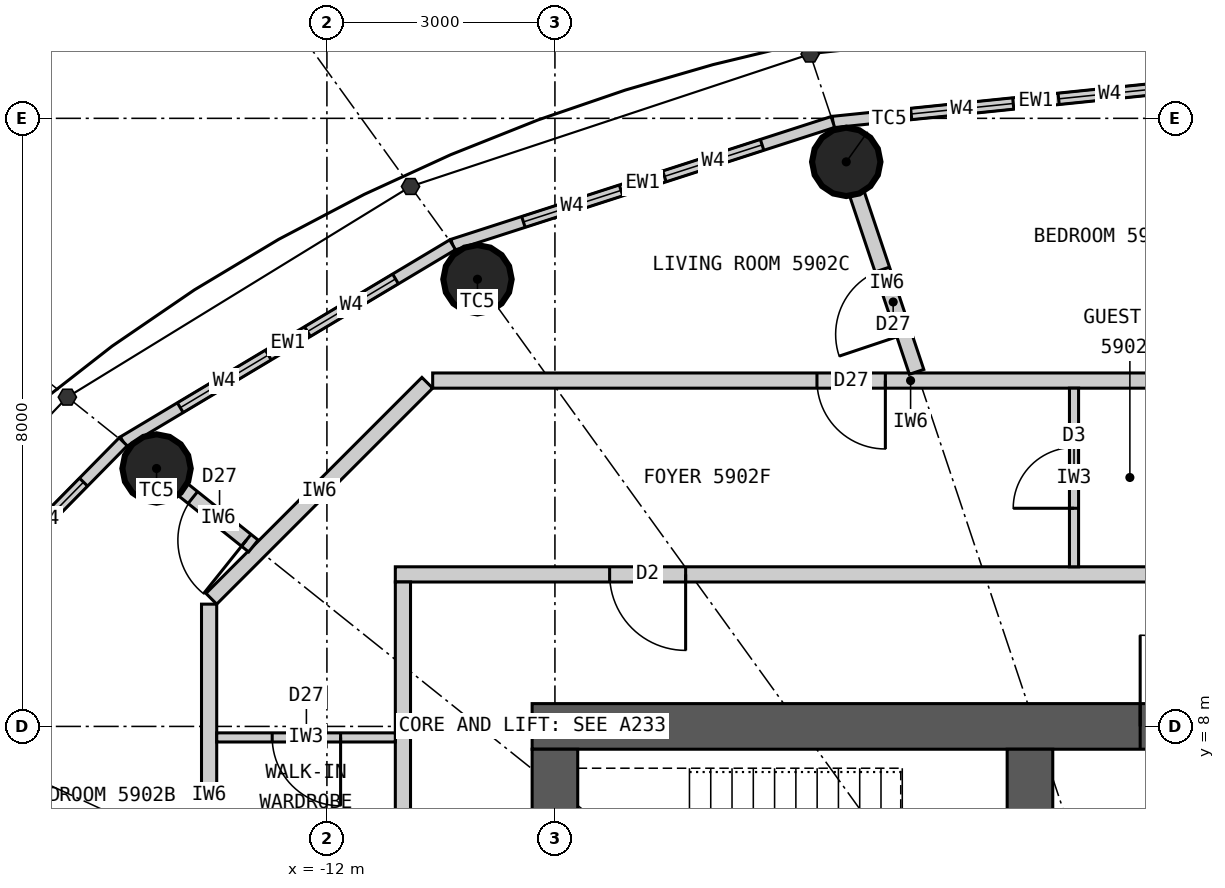
"""IFC4 building model, lengths in metres.
Left out: names, types, materials, properties, quantities, classifications, styles, units other than length and angle.
Written with IfcOpenShell. Run it as: python <this file> out.ifc"""

import sys

from ifc_helpers import new_model, si_unit, direction, frame, frame_2d, origin, origin_2d, place, context, subcontext, project, spatial, rectangle, circle, extrude, element, fill, save


model = new_model("IFC4")
c1 = context("Model", 3, precision=1e-05, world=origin(), true_north=direction((0.0, 1.0)))
c2 = subcontext(c1, "Body", "Model", "MODEL_VIEW")
j1 = project(units=[si_unit("LENGTHUNIT", "METRE"), si_unit("PLANEANGLEUNIT", "RADIAN")], contexts=[c1])
p1 = place(None, origin())
s1 = spatial("IfcSite", under=j1, at=p1, CompositionType="ELEMENT")
p2 = place(p1, origin())
s2 = spatial("IfcBuilding", under=s1, at=p2, CompositionType="ELEMENT")
p3 = place(p2, frame((0.0, 0.0, 219.3)))
s3 = spatial("IfcBuildingStorey", under=s2, at=p3, CompositionType="ELEMENT", Elevation=219.3)
for number, where, z_axis, x_axis in (
    (1, (-5.167, 15.427, 0.0), (0.0, 0.0, 1.0), (1.0, 0.0, 0.0)),
    (2, (-10.019, 13.883, 0.0), (0.0, 0.0, 1.0), (1.0, 0.0, 0.0)),
    (3, (-14.241, 11.393, 0.0), (0.0, 0.0, 1.0), (1.0, 0.0, 0.0)),
):
    element("IfcColumn", number, at=place(p3, frame(where, z_axis=z_axis, x_axis=x_axis)), inside=s3, PredefinedType="COLUMN", context=c2, shape_type="SweptSolid", body=[
        extrude(circle(Radius=0.45, at=origin_2d()), origin(), (0.0, 0.0, 1.0), 3.3),
    ])
p4 = place(p3, frame((-9.3, 8.0, 0.0), z_axis=(0.0, 0.0, 1.0), x_axis=(1.0, 0.0, 0.0)))
e4 = element("IfcWall", 4, at=p4, inside=s3, PredefinedType="SHEAR", context=c2, shape_type="SweptSolid", body=[
    extrude(rectangle(XDim=18.6, YDim=0.6, at=frame_2d((9.3, 0.0))), origin(), (0.0, 0.0, 1.0), 3.3),
])
p5 = place(p4, frame((8.0, 0.0, 0.0)))
e5 = element("IfcOpeningElement", 5, at=p5, cuts=e4, PredefinedType="OPENING", context=c2, shape_type="SweptSolid", body=[
    extrude(rectangle(XDim=1.2, YDim=2.2, at=frame_2d((0.6, 1.1))), frame((0.0, 0.31, 0.0), z_axis=(0.0, -1.0, 0.0), x_axis=(1.0, 0.0, 0.0)), (0.0, 0.0, 1.0), 0.62),
])
p6 = place(p4, frame((15.6, 0.0, 0.0)))
e6 = element("IfcOpeningElement", 6, at=p6, cuts=e4, PredefinedType="OPENING", context=c2, shape_type="SweptSolid", body=[
    extrude(rectangle(XDim=0.9, YDim=2.2, at=frame_2d((0.45, 1.1))), frame((0.0, 0.31, 0.0), z_axis=(0.0, -1.0, 0.0), x_axis=(1.0, 0.0, 0.0)), (0.0, 0.0, 1.0), 0.62),
])
p7 = place(p3, frame((-9.0, 7.7, 0.0), z_axis=(0.0, 0.0, 1.0), x_axis=(0.0, -1.0, 0.0)))
e7 = element("IfcWall", 7, at=p7, inside=s3, PredefinedType="SHEAR", context=c2, shape_type="SweptSolid", body=[
    extrude(rectangle(XDim=15.4, YDim=0.6, at=frame_2d((7.7, 0.0))), origin(), (0.0, 0.0, 1.0), 3.3),
])
p8 = place(p7, frame((6.8, 0.0, 0.0)))
e8 = element("IfcOpeningElement", 8, at=p8, cuts=e7, PredefinedType="OPENING", context=c2, shape_type="SweptSolid", body=[
    extrude(rectangle(XDim=1.8, YDim=2.2, at=frame_2d((0.9, 1.1))), frame((0.0, 0.31, 0.0), z_axis=(0.0, -1.0, 0.0), x_axis=(1.0, 0.0, 0.0)), (0.0, 0.0, 1.0), 0.62),
])
p9 = place(p3, frame((-2.75, 4.5, 0.0), z_axis=(0.0, 0.0, 1.0), x_axis=(0.0, 1.0, 0.0)))
e9 = element("IfcWall", 9, at=p9, inside=s3, PredefinedType="SHEAR", context=c2, shape_type="SweptSolid", body=[
    extrude(rectangle(XDim=3.2, YDim=0.6, at=frame_2d((1.6, 0.0))), origin(), (0.0, 0.0, 1.0), 3.3),
])
p10 = place(p9, frame((0.925, 0.0, 0.0)))
e10 = element("IfcOpeningElement", 10, at=p10, cuts=e9, PredefinedType="OPENING", context=c2, shape_type="SweptSolid", body=[
    extrude(rectangle(XDim=1.1, YDim=2.2, at=frame_2d((0.55, 1.1))), frame((0.0, 0.31, 0.0), z_axis=(0.0, -1.0, 0.0), x_axis=(1.0, 0.0, 0.0)), (0.0, 0.0, 1.0), 0.62),
])
p11 = place(p3, frame((0.0, 16.5, 0.0), z_axis=(0.0, 0.0, 1.0), x_axis=(-0.994774574972, -0.102095763818, 0.0)))
e11 = element("IfcWall", 11, at=p11, inside=s3, PredefinedType="ELEMENTEDWALL", context=c2, shape_type="SweptSolid", body=[
    extrude(rectangle(XDim=5.371, YDim=0.15, at=frame_2d((2.686, 0.0))), origin(), (0.0, 0.0, 1.0), 3.12),
])
p12 = place(p11, frame((1.035, 0.0, 0.9)))
e12 = element("IfcOpeningElement", 12, at=p12, cuts=e11, PredefinedType="OPENING", context=c2, shape_type="SweptSolid", body=[
    extrude(rectangle(XDim=1.35, YDim=1.9, at=frame_2d((0.675, 0.95))), frame((0.0, 0.085, 0.0), z_axis=(0.0, -1.0, 0.0), x_axis=(1.0, 0.0, 0.0)), (0.0, 0.0, 1.0), 0.17),
])
p13 = place(p11, frame((2.985, 0.0, 0.9)))
e13 = element("IfcOpeningElement", 13, at=p13, cuts=e11, PredefinedType="OPENING", context=c2, shape_type="SweptSolid", body=[
    extrude(rectangle(XDim=1.35, YDim=1.9, at=frame_2d((0.675, 0.95))), frame((0.0, 0.085, 0.0), z_axis=(0.0, -1.0, 0.0), x_axis=(1.0, 0.0, 0.0)), (0.0, 0.0, 1.0), 0.17),
])
p14 = place(p3, frame((-5.343, 15.952, 0.0), z_axis=(0.0, 0.0, 1.0), x_axis=(-0.951644702515, -0.307200846638, 0.0)))
e14 = element("IfcWall", 14, at=p14, inside=s3, PredefinedType="ELEMENTEDWALL", context=c2, shape_type="SweptSolid", body=[
    extrude(rectangle(XDim=5.258, YDim=0.15, at=frame_2d((2.629, 0.0))), origin(), (0.0, 0.0, 1.0), 3.12),
])
p15 = place(p14, frame((0.979, 0.0, 0.9)))
e15 = element("IfcOpeningElement", 15, at=p15, cuts=e14, PredefinedType="OPENING", context=c2, shape_type="SweptSolid", body=[
    extrude(rectangle(XDim=1.35, YDim=1.9, at=frame_2d((0.675, 0.95))), frame((0.0, 0.085, 0.0), z_axis=(0.0, -1.0, 0.0), x_axis=(1.0, 0.0, 0.0)), (0.0, 0.0, 1.0), 0.17),
])
p16 = place(p14, frame((2.929, 0.0, 0.9)))
e16 = element("IfcOpeningElement", 16, at=p16, cuts=e14, PredefinedType="OPENING", context=c2, shape_type="SweptSolid", body=[
    extrude(rectangle(XDim=1.35, YDim=1.9, at=frame_2d((0.675, 0.95))), frame((0.0, 0.085, 0.0), z_axis=(0.0, -1.0, 0.0), x_axis=(1.0, 0.0, 0.0)), (0.0, 0.0, 1.0), 0.17),
])
p17 = place(p3, frame((-10.346, 14.336, 0.0), z_axis=(0.0, 0.0, 1.0), x_axis=(-0.85822150553, -0.513279502265, 0.0)))
e17 = element("IfcWall", 17, at=p17, inside=s3, PredefinedType="ELEMENTEDWALL", context=c2, shape_type="SweptSolid", body=[
    extrude(rectangle(XDim=5.05, YDim=0.15, at=frame_2d((2.525, 0.0))), origin(), (0.0, 0.0, 1.0), 3.12),
])
p18 = place(p17, frame((0.875, 0.0, 0.9)))
e18 = element("IfcOpeningElement", 18, at=p18, cuts=e17, PredefinedType="OPENING", context=c2, shape_type="SweptSolid", body=[
    extrude(rectangle(XDim=1.35, YDim=1.9, at=frame_2d((0.675, 0.95))), frame((0.0, 0.085, 0.0), z_axis=(0.0, -1.0, 0.0), x_axis=(1.0, 0.0, 0.0)), (0.0, 0.0, 1.0), 0.17),
])
p19 = place(p17, frame((2.825, 0.0, 0.9)))
e19 = element("IfcOpeningElement", 19, at=p19, cuts=e17, PredefinedType="OPENING", context=c2, shape_type="SweptSolid", body=[
    extrude(rectangle(XDim=1.35, YDim=1.9, at=frame_2d((0.675, 0.95))), frame((0.0, 0.085, 0.0), z_axis=(0.0, -1.0, 0.0), x_axis=(1.0, 0.0, 0.0)), (0.0, 0.0, 1.0), 0.17),
])
p20 = place(p3, frame((-14.68, 11.744, 0.0), z_axis=(0.0, 0.0, 1.0), x_axis=(-0.701527379618, -0.712642501993, 0.0)))
e20 = element("IfcWall", 20, at=p20, inside=s3, PredefinedType="ELEMENTEDWALL", context=c2, shape_type="SweptSolid", body=[
    extrude(rectangle(XDim=4.788, YDim=0.15, at=frame_2d((2.394, 0.0))), origin(), (0.0, 0.0, 1.0), 3.12),
])
p21 = place(p20, frame((0.744, 0.0, 0.9)))
e21 = element("IfcOpeningElement", 21, at=p21, cuts=e20, PredefinedType="OPENING", context=c2, shape_type="SweptSolid", body=[
    extrude(rectangle(XDim=1.35, YDim=1.9, at=frame_2d((0.675, 0.95))), frame((0.0, 0.085, 0.0), z_axis=(0.0, -1.0, 0.0), x_axis=(1.0, 0.0, 0.0)), (0.0, 0.0, 1.0), 0.17),
])
p22 = place(p20, frame((2.694, 0.0, 0.9)))
e22 = element("IfcOpeningElement", 22, at=p22, cuts=e20, PredefinedType="OPENING", context=c2, shape_type="SweptSolid", body=[
    extrude(rectangle(XDim=1.35, YDim=1.9, at=frame_2d((0.675, 0.95))), frame((0.0, 0.085, 0.0), z_axis=(0.0, -1.0, 0.0), x_axis=(1.0, 0.0, 0.0)), (0.0, 0.0, 1.0), 0.17),
])
p23 = place(p3, frame((-11.1, 10.0, 0.0), z_axis=(0.0, 0.0, 1.0), x_axis=(1.0, 0.0, 0.0)))
e23 = element("IfcWall", 23, at=p23, inside=s3, PredefinedType="PARTITIONING", context=c2, shape_type="SweptSolid", body=[
    extrude(rectangle(XDim=22.2, YDim=0.2, at=frame_2d((11.1, 0.0))), origin(), (0.0, 0.0, 1.0), 3.12),
])
p24 = place(p23, frame((20.9, 0.0, 0.0)))
e24 = element("IfcOpeningElement", 24, at=p24, cuts=e23, PredefinedType="OPENING", context=c2, shape_type="SweptSolid", body=[
    extrude(rectangle(XDim=1.0, YDim=2.2, at=frame_2d((0.5, 1.1))), frame((0.0, 0.11, 0.0), z_axis=(0.0, -1.0, 0.0), x_axis=(1.0, 0.0, 0.0)), (0.0, 0.0, 1.0), 0.22),
])
p25 = place(p23, frame((2.82, 0.0, 0.0)))
e25 = element("IfcOpeningElement", 25, at=p25, cuts=e23, PredefinedType="OPENING", context=c2, shape_type="SweptSolid", body=[
    extrude(rectangle(XDim=1.0, YDim=2.2, at=frame_2d((0.5, 1.1))), frame((0.0, 0.11, 0.0), z_axis=(0.0, -1.0, 0.0), x_axis=(1.0, 0.0, 0.0)), (0.0, 0.0, 1.0), 0.22),
])
p26 = place(p3, frame((-11.0, 9.9, 0.0), z_axis=(0.0, 0.0, 1.0), x_axis=(0.0, -1.0, 0.0)))
e26 = element("IfcWall", 26, at=p26, inside=s3, PredefinedType="PARTITIONING", context=c2, shape_type="SweptSolid", body=[
    extrude(rectangle(XDim=10.114, YDim=0.2, at=frame_2d((5.057, 0.0))), origin(), (0.0, 0.0, 1.0), 3.12),
])
p27 = place(p3, frame((1.968, 12.55, 0.0), z_axis=(0.0, 0.0, 1.0), x_axis=(-1.0, 0.0, 0.0)))
e27 = element("IfcWall", 27, at=p27, inside=s3, PredefinedType="PARTITIONING", context=c2, shape_type="SweptSolid", body=[
    extrude(rectangle(XDim=12.576, YDim=0.2, at=frame_2d((6.288, 0.0))), origin(), (0.0, 0.0, 1.0), 3.12),
])
p28 = place(p27, frame((1.708, 0.0, 0.0)))
e28 = element("IfcOpeningElement", 28, at=p28, cuts=e27, PredefinedType="OPENING", context=c2, shape_type="SweptSolid", body=[
    extrude(rectangle(XDim=0.8, YDim=2.1, at=frame_2d((0.4, 1.05))), frame((0.0, 0.11, 0.0), z_axis=(0.0, -1.0, 0.0), x_axis=(1.0, 0.0, 0.0)), (0.0, 0.0, 1.0), 0.22),
])
p29 = place(p27, frame((6.62, 0.0, 0.0)))
e29 = element("IfcOpeningElement", 29, at=p29, cuts=e27, PredefinedType="OPENING", context=c2, shape_type="SweptSolid", body=[
    extrude(rectangle(XDim=0.9, YDim=2.1, at=frame_2d((0.45, 1.05))), frame((0.0, 0.11, 0.0), z_axis=(0.0, -1.0, 0.0), x_axis=(1.0, 0.0, 0.0)), (0.0, 0.0, 1.0), 0.22),
])
p30 = place(p3, frame((-10.679, 12.521, 0.0), z_axis=(0.0, 0.0, 1.0), x_axis=(-0.707106781187, -0.707106781187, 0.0)))
e30 = element("IfcWall", 30, at=p30, inside=s3, PredefinedType="PARTITIONING", context=c2, shape_type="SweptSolid", body=[
    extrude(rectangle(XDim=4.019, YDim=0.2, at=frame_2d((2.009, 0.0))), origin(), (0.0, 0.0, 1.0), 3.12),
])
p31 = place(p3, frame((-13.55, 9.609, 0.0), z_axis=(0.0, 0.0, 1.0), x_axis=(0.0, -1.0, 0.0)))
e31 = element("IfcWall", 31, at=p31, inside=s3, PredefinedType="PARTITIONING", context=c2, shape_type="SweptSolid", body=[
    extrude(rectangle(XDim=5.009, YDim=0.2, at=frame_2d((2.504, 0.0))), origin(), (0.0, 0.0, 1.0), 3.12),
])
p32 = place(p31, frame((3.633, 0.0, 0.0)))
e32 = element("IfcOpeningElement", 32, at=p32, cuts=e31, PredefinedType="OPENING", context=c2, shape_type="SweptSolid", body=[
    extrude(rectangle(XDim=0.8, YDim=2.1, at=frame_2d((0.4, 1.05))), frame((0.0, 0.11, 0.0), z_axis=(0.0, -1.0, 0.0), x_axis=(1.0, 0.0, 0.0)), (0.0, 0.0, 1.0), 0.22),
])
p33 = place(p3, frame((-4.242, 12.664, 0.0), z_axis=(0.0, 0.0, 1.0), x_axis=(-0.317594928911, 0.948226481981, 0.0)))
e33 = element("IfcWall", 33, at=p33, inside=s3, PredefinedType="PARTITIONING", context=c2, shape_type="SweptSolid", body=[
    extrude(rectangle(XDim=2.464, YDim=0.2, at=frame_2d((1.232, 0.0))), origin(), (0.0, 0.0, 1.0), 2.42),
])
p34 = place(p33, frame((0.52, 0.0, 0.0)))
e34 = element("IfcOpeningElement", 34, at=p34, cuts=e33, PredefinedType="OPENING", context=c2, shape_type="SweptSolid", body=[
    extrude(rectangle(XDim=0.9, YDim=2.1, at=frame_2d((0.45, 1.05))), frame((0.0, 0.11, 0.0), z_axis=(0.0, -1.0, 0.0), x_axis=(1.0, 0.0, 0.0)), (0.0, 0.0, 1.0), 0.22),
])
p35 = place(p3, frame((-12.968, 10.374, 0.0), z_axis=(0.0, 0.0, 1.0), x_axis=(-0.780888968944, 0.624669847345, 0.0)))
e35 = element("IfcWall", 35, at=p35, inside=s3, PredefinedType="PARTITIONING", context=c2, shape_type="SweptSolid", body=[
    extrude(rectangle(XDim=1.181, YDim=0.2, at=frame_2d((0.591, 0.0))), origin(), (0.0, 0.0, 1.0), 2.42),
])
p36 = place(p35, frame((0.12, 0.0, 0.0)))
e36 = element("IfcOpeningElement", 36, at=p36, cuts=e35, PredefinedType="OPENING", context=c2, shape_type="SweptSolid", body=[
    extrude(rectangle(XDim=0.9, YDim=2.1, at=frame_2d((0.45, 1.05))), frame((0.0, 0.11, 0.0), z_axis=(0.0, -1.0, 0.0), x_axis=(1.0, 0.0, 0.0)), (0.0, 0.0, 1.0), 0.22),
])
p37 = place(p3, frame((-2.17, 10.1, 0.0), z_axis=(0.0, 0.0, 1.0), x_axis=(0.0, 1.0, 0.0)))
e37 = element("IfcWall", 37, at=p37, inside=s3, PredefinedType="PARTITIONING", context=c2, shape_type="SweptSolid", body=[
    extrude(rectangle(XDim=2.35, YDim=0.12, at=frame_2d((1.175, 0.0))), origin(), (0.0, 0.0, 1.0), 3.12),
])
p38 = place(p37, frame((0.77, 0.0, 0.0)))
e38 = element("IfcOpeningElement", 38, at=p38, cuts=e37, PredefinedType="OPENING", context=c2, shape_type="SweptSolid", body=[
    extrude(rectangle(XDim=0.8, YDim=2.1, at=frame_2d((0.4, 1.05))), frame((0.0, 0.07, 0.0), z_axis=(0.0, -1.0, 0.0), x_axis=(1.0, 0.0, 0.0)), (0.0, 0.0, 1.0), 0.14),
])
p39 = place(p3, frame((-11.1, 7.855, 0.0), z_axis=(0.0, 0.0, 1.0), x_axis=(-1.0, 0.0, 0.0)))
e39 = element("IfcWall", 39, at=p39, inside=s3, PredefinedType="PARTITIONING", context=c2, shape_type="SweptSolid", body=[
    extrude(rectangle(XDim=2.35, YDim=0.12, at=frame_2d((1.175, 0.0))), origin(), (0.0, 0.0, 1.0), 3.12),
])
p40 = place(p39, frame((0.72, 0.0, 0.0)))
e40 = element("IfcOpeningElement", 40, at=p40, cuts=e39, PredefinedType="OPENING", context=c2, shape_type="SweptSolid", body=[
    extrude(rectangle(XDim=0.9, YDim=2.1, at=frame_2d((0.45, 1.05))), frame((0.0, 0.07, 0.0), z_axis=(0.0, -1.0, 0.0), x_axis=(1.0, 0.0, 0.0)), (0.0, 0.0, 1.0), 0.14),
])
p41 = place(p12, origin())
e41 = element("IfcWindow", 41, at=p41, inside=s3, PartitioningType="SINGLE_PANEL", PredefinedType="WINDOW", context=c2, shape_type="SweptSolid", body=[
    extrude(rectangle(XDim=1.35, YDim=1.9, at=frame_2d((0.675, 0.95))), frame((0.0, 0.03, 0.0), z_axis=(0.0, -1.0, 0.0), x_axis=(1.0, 0.0, 0.0)), (0.0, 0.0, 1.0), 0.06),
])
fill(e12, e41)
p42 = place(p13, origin())
e42 = element("IfcWindow", 42, at=p42, inside=s3, PartitioningType="SINGLE_PANEL", PredefinedType="WINDOW", context=c2, shape_type="SweptSolid", body=[
    extrude(rectangle(XDim=1.35, YDim=1.9, at=frame_2d((0.675, 0.95))), frame((0.0, 0.03, 0.0), z_axis=(0.0, -1.0, 0.0), x_axis=(1.0, 0.0, 0.0)), (0.0, 0.0, 1.0), 0.06),
])
fill(e13, e42)
p43 = place(p15, origin())
e43 = element("IfcWindow", 43, at=p43, inside=s3, PartitioningType="SINGLE_PANEL", PredefinedType="WINDOW", context=c2, shape_type="SweptSolid", body=[
    extrude(rectangle(XDim=1.35, YDim=1.9, at=frame_2d((0.675, 0.95))), frame((0.0, 0.03, 0.0), z_axis=(0.0, -1.0, 0.0), x_axis=(1.0, 0.0, 0.0)), (0.0, 0.0, 1.0), 0.06),
])
fill(e15, e43)
p44 = place(p16, origin())
e44 = element("IfcWindow", 44, at=p44, inside=s3, PartitioningType="SINGLE_PANEL", PredefinedType="WINDOW", context=c2, shape_type="SweptSolid", body=[
    extrude(rectangle(XDim=1.35, YDim=1.9, at=frame_2d((0.675, 0.95))), frame((0.0, 0.03, 0.0), z_axis=(0.0, -1.0, 0.0), x_axis=(1.0, 0.0, 0.0)), (0.0, 0.0, 1.0), 0.06),
])
fill(e16, e44)
p45 = place(p18, origin())
e45 = element("IfcWindow", 45, at=p45, inside=s3, PartitioningType="SINGLE_PANEL", PredefinedType="WINDOW", context=c2, shape_type="SweptSolid", body=[
    extrude(rectangle(XDim=1.35, YDim=1.9, at=frame_2d((0.675, 0.95))), frame((0.0, 0.03, 0.0), z_axis=(0.0, -1.0, 0.0), x_axis=(1.0, 0.0, 0.0)), (0.0, 0.0, 1.0), 0.06),
])
fill(e18, e45)
p46 = place(p19, origin())
e46 = element("IfcWindow", 46, at=p46, inside=s3, PartitioningType="SINGLE_PANEL", PredefinedType="WINDOW", context=c2, shape_type="SweptSolid", body=[
    extrude(rectangle(XDim=1.35, YDim=1.9, at=frame_2d((0.675, 0.95))), frame((0.0, 0.03, 0.0), z_axis=(0.0, -1.0, 0.0), x_axis=(1.0, 0.0, 0.0)), (0.0, 0.0, 1.0), 0.06),
])
fill(e19, e46)
p47 = place(p21, origin())
e47 = element("IfcWindow", 47, at=p47, inside=s3, PartitioningType="SINGLE_PANEL", PredefinedType="WINDOW", context=c2, shape_type="SweptSolid", body=[
    extrude(rectangle(XDim=1.35, YDim=1.9, at=frame_2d((0.675, 0.95))), frame((0.0, 0.03, 0.0), z_axis=(0.0, -1.0, 0.0), x_axis=(1.0, 0.0, 0.0)), (0.0, 0.0, 1.0), 0.06),
])
fill(e21, e47)
p48 = place(p25, origin())
e48 = element("IfcDoor", 48, at=p48, inside=s3, OperationType="SINGLE_SWING_RIGHT", PredefinedType="DOOR", context=c2, shape_type="SweptSolid", body=[
    extrude(rectangle(XDim=1.0, YDim=2.2, at=frame_2d((0.5, 1.1))), frame((0.0, 0.025, 0.0), z_axis=(0.0, -1.0, 0.0), x_axis=(1.0, 0.0, 0.0)), (0.0, 0.0, 1.0), 0.05),
])
fill(e25, e48)
p49 = place(p38, origin())
e49 = element("IfcDoor", 49, at=p49, inside=s3, OperationType="SINGLE_SWING_LEFT", PredefinedType="DOOR", context=c2, shape_type="SweptSolid", body=[
    extrude(rectangle(XDim=0.8, YDim=2.1, at=frame_2d((0.4, 1.05))), frame((0.0, 0.025, 0.0), z_axis=(0.0, -1.0, 0.0), x_axis=(1.0, 0.0, 0.0)), (0.0, 0.0, 1.0), 0.05),
])
fill(e38, e49)
p50 = place(p40, origin())
e50 = element("IfcDoor", 50, at=p50, inside=s3, OperationType="SINGLE_SWING_LEFT", PredefinedType="DOOR", context=c2, shape_type="SweptSolid", body=[
    extrude(rectangle(XDim=0.9, YDim=2.1, at=frame_2d((0.45, 1.05))), frame((0.0, 0.025, 0.0), z_axis=(0.0, -1.0, 0.0), x_axis=(1.0, 0.0, 0.0)), (0.0, 0.0, 1.0), 0.05),
])
fill(e40, e50)
p51 = place(p29, origin())
e51 = element("IfcDoor", 51, at=p51, inside=s3, OperationType="SINGLE_SWING_LEFT", PredefinedType="DOOR", context=c2, shape_type="SweptSolid", body=[
    extrude(rectangle(XDim=0.9, YDim=2.1, at=frame_2d((0.45, 1.05))), frame((0.0, 0.025, 0.0), z_axis=(0.0, -1.0, 0.0), x_axis=(1.0, 0.0, 0.0)), (0.0, 0.0, 1.0), 0.05),
])
fill(e29, e51)
p52 = place(p34, origin())
e52 = element("IfcDoor", 52, at=p52, inside=s3, OperationType="SINGLE_SWING_LEFT", PredefinedType="DOOR", context=c2, shape_type="SweptSolid", body=[
    extrude(rectangle(XDim=0.9, YDim=2.1, at=frame_2d((0.45, 1.05))), frame((0.0, 0.025, 0.0), z_axis=(0.0, -1.0, 0.0), x_axis=(1.0, 0.0, 0.0)), (0.0, 0.0, 1.0), 0.05),
])
fill(e34, e52)
p53 = place(p36, origin())
e53 = element("IfcDoor", 53, at=p53, inside=s3, OperationType="SINGLE_SWING_LEFT", PredefinedType="DOOR", context=c2, shape_type="SweptSolid", body=[
    extrude(rectangle(XDim=0.9, YDim=2.1, at=frame_2d((0.45, 1.05))), frame((0.0, 0.025, 0.0), z_axis=(0.0, -1.0, 0.0), x_axis=(1.0, 0.0, 0.0)), (0.0, 0.0, 1.0), 0.05),
])
fill(e36, e53)
p54 = place(p5, origin())
e54 = element("IfcDoor", 54, at=p54, inside=s3, OperationType="SINGLE_SWING_LEFT", PredefinedType="DOOR", context=c2, shape_type="SweptSolid", body=[
    extrude(rectangle(XDim=1.2, YDim=2.2, at=frame_2d((0.6, 1.1))), frame((0.0, 0.025, 0.0), z_axis=(0.0, -1.0, 0.0), x_axis=(1.0, 0.0, 0.0)), (0.0, 0.0, 1.0), 0.05),
])
fill(e5, e54)
save(model, sys.argv[1])
